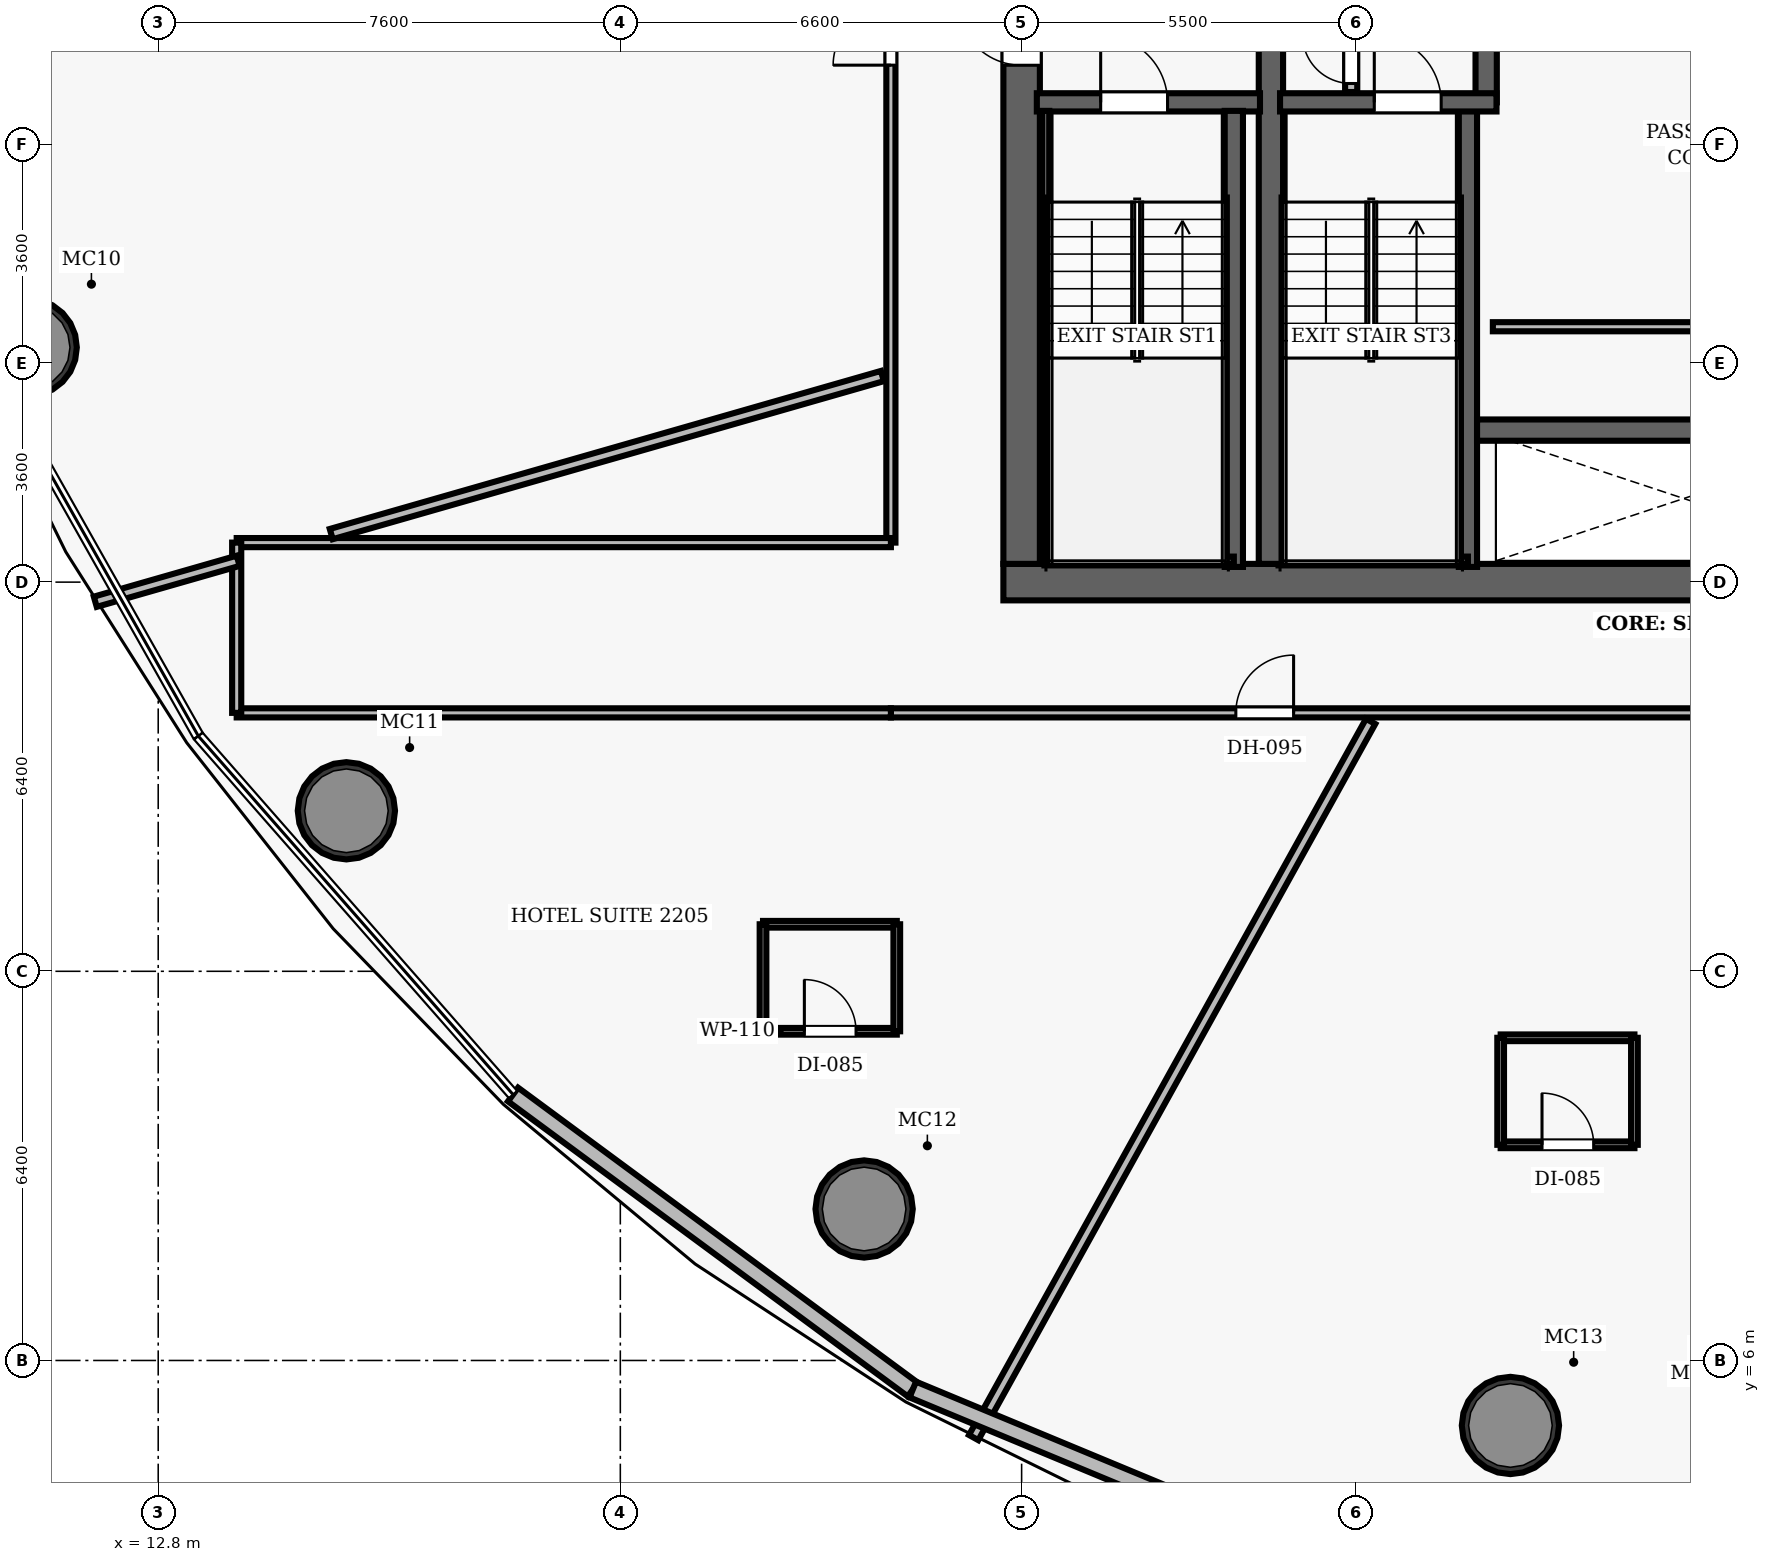
"""IFC4 building model, lengths in metres.
Left out: names, types, materials, properties, quantities, classifications, styles, units other than length and angle.
Written with IfcOpenShell. Run it as: python <this file> out.ifc"""

import sys

from ifc_helpers import new_model, si_unit, direction, frame, frame_2d, origin, origin_2d, place, context, subcontext, project, spatial, rectangle, hollow_circle, extrude, element, fill, save


model = new_model("IFC4")
c1 = context("Model", 3, precision=1e-05, world=origin(), true_north=direction((0.0, 1.0)))
c2 = subcontext(c1, "Body", "Model", "MODEL_VIEW")
j1 = project(units=[si_unit("LENGTHUNIT", "METRE"), si_unit("PLANEANGLEUNIT", "RADIAN")], contexts=[c1])
p1 = place(None, origin())
s1 = spatial("IfcSite", under=j1, at=p1, CompositionType="ELEMENT")
p2 = place(p1, origin())
s2 = spatial("IfcBuilding", under=s1, at=p2, CompositionType="ELEMENT")
p3 = place(p2, frame((0.0, 0.0, 93.9)))
s3 = spatial("IfcBuildingStorey", under=s2, at=p3, CompositionType="ELEMENT", Elevation=93.9)
p4 = place(p3, frame((26.7, 18.8, 0.0), z_axis=(0.0, 0.0, 1.0), x_axis=(1.0, 0.0, 0.0)))
e1 = element("IfcWall", 1, at=p4, inside=s3, PredefinedType="SHEAR", context=c2, shape_type="SweptSolid", body=[
    extrude(rectangle(XDim=22.6, YDim=0.6, at=frame_2d((11.3, 0.0))), origin(), (0.0, 0.0, 1.0), 3.5),
])
p5 = place(p4, frame((14.52, 0.0, 0.0)))
e2 = element("IfcOpeningElement", 2, at=p5, cuts=e1, PredefinedType="OPENING", context=c2, shape_type="SweptSolid", body=[
    extrude(rectangle(XDim=1.05, YDim=2.15, at=frame_2d((0.525, 1.075))), frame((0.0, 0.31, 0.0), z_axis=(0.0, -1.0, 0.0), x_axis=(1.0, 0.0, 0.0)), (0.0, 0.0, 1.0), 0.62),
])
p6 = place(p3, frame((27.0, 19.1, 0.0), z_axis=(0.0, 0.0, 1.0), x_axis=(0.0, 1.0, 0.0)))
e3 = element("IfcWall", 3, at=p6, inside=s3, PredefinedType="SHEAR", context=c2, shape_type="SweptSolid", body=[
    extrude(rectangle(XDim=13.8, YDim=0.6, at=frame_2d((6.9, 0.0))), origin(), (0.0, 0.0, 1.0), 3.5),
])
p7 = place(p6, frame((8.2, 0.0, 0.0)))
e4 = element("IfcOpeningElement", 4, at=p7, cuts=e3, PredefinedType="OPENING", context=c2, shape_type="SweptSolid", body=[
    extrude(rectangle(XDim=1.05, YDim=2.15, at=frame_2d((0.525, 1.075))), frame((0.0, 0.31, 0.0), z_axis=(0.0, -1.0, 0.0), x_axis=(1.0, 0.0, 0.0)), (0.0, 0.0, 1.0), 0.62),
])
p8 = place(p3, frame((31.1, 19.1, 0.0), z_axis=(0.0, 0.0, 1.0), x_axis=(0.0, 1.0, 0.0)))
e5 = element("IfcWall", 5, at=p8, inside=s3, PredefinedType="SHEAR", context=c2, shape_type="SweptSolid", body=[
    extrude(rectangle(XDim=13.8, YDim=0.4, at=frame_2d((6.9, 0.0))), origin(), (0.0, 0.0, 1.0), 3.5),
])
for number, where, z_axis, x_axis in (
    (6, (10.661, 22.66, 0.0), (0.0, 0.0, 1.0), (1.0, 0.0, 0.0)),
    (7, (15.895, 15.04, 0.0), (0.0, 0.0, 1.0), (1.0, 0.0, 0.0)),
    (8, (24.41, 8.491, 0.0), (0.0, 0.0, 1.0), (1.0, 0.0, 0.0)),
    (9, (35.039, 4.931, 0.0), (0.0, 0.0, 1.0), (1.0, 0.0, 0.0)),
):
    element("IfcColumn", number, at=place(p3, frame(where, z_axis=z_axis, x_axis=x_axis)), inside=s3, PredefinedType="COLUMN", context=c2, shape_type="SweptSolid", body=[
        extrude(hollow_circle(Radius=0.8, WallThickness=0.06, at=origin_2d()), origin(), (0.0, 0.0, 1.0), 3.5),
    ])
p9 = place(p3, frame((27.25, 26.69, 0.0), z_axis=(0.0, 0.0, 1.0), x_axis=(1.0, 0.0, 0.0)))
e10 = element("IfcWall", 10, at=p9, inside=s3, PredefinedType="SHEAR", context=c2, shape_type="SweptSolid", body=[
    extrude(rectangle(XDim=3.67, YDim=0.3, at=frame_2d((1.835, 0.0))), origin(), (0.0, 0.0, 1.0), 3.5),
])
p10 = place(p9, frame((1.05, 0.0, 0.0)))
e11 = element("IfcOpeningElement", 11, at=p10, cuts=e10, PredefinedType="OPENING", context=c2, shape_type="SweptSolid", body=[
    extrude(rectangle(XDim=1.1, YDim=2.15, at=frame_2d((0.55, 1.075))), frame((0.0, 0.16, 0.0), z_axis=(0.0, -1.0, 0.0), x_axis=(1.0, 0.0, 0.0)), (0.0, 0.0, 1.0), 0.32),
])
p11 = place(p3, frame((30.49, 19.05, 0.0), z_axis=(0.0, 0.0, 1.0), x_axis=(0.0, 1.0, 0.0)))
e12 = element("IfcWall", 12, at=p11, inside=s3, PredefinedType="SHEAR", context=c2, shape_type="SweptSolid", body=[
    extrude(rectangle(XDim=7.5, YDim=0.3, at=frame_2d((3.75, 0.0))), origin(), (0.0, 0.0, 1.0), 3.5),
])
p12 = place(p3, frame((27.395, 19.1, 0.0), z_axis=(0.0, 0.0, 1.0), x_axis=(0.0, 1.0, 0.0)))
e13 = element("IfcWall", 13, at=p12, inside=s3, PredefinedType="SHEAR", context=c2, shape_type="SweptSolid", body=[
    extrude(rectangle(XDim=7.45, YDim=0.12, at=frame_2d((3.725, 0.0))), origin(), (0.0, 0.0, 1.0), 3.5),
])
p13 = place(p3, frame((27.395, 19.16, 0.0), z_axis=(0.0, 0.0, 1.0), x_axis=(1.0, 0.0, 0.0)))
e14 = element("IfcWall", 14, at=p13, inside=s3, PredefinedType="SHEAR", context=c2, shape_type="SweptSolid", body=[
    extrude(rectangle(XDim=3.095, YDim=0.12, at=frame_2d((1.547, 0.0))), origin(), (0.0, 0.0, 1.0), 3.5),
])
p14 = place(p3, frame((34.34, 19.05, 0.0), z_axis=(0.0, 0.0, 1.0), x_axis=(0.0, 1.0, 0.0)))
e15 = element("IfcWall", 15, at=p14, inside=s3, PredefinedType="SHEAR", context=c2, shape_type="SweptSolid", body=[
    extrude(rectangle(XDim=7.5, YDim=0.3, at=frame_2d((3.75, 0.0))), origin(), (0.0, 0.0, 1.0), 3.5),
])
p15 = place(p3, frame((34.64, 26.69, 0.0), z_axis=(0.0, 0.0, 1.0), x_axis=(0.0, 1.0, 0.0)))
e16 = element("IfcWall", 16, at=p15, inside=s3, PredefinedType="SHEAR", context=c2, shape_type="SweptSolid", body=[
    extrude(rectangle(XDim=6.26, YDim=0.35, at=frame_2d((3.13, 0.0))), origin(), (0.0, 0.0, 1.0), 3.5),
])
p16 = place(p3, frame((31.25, 26.69, 0.0), z_axis=(0.0, 0.0, 1.0), x_axis=(1.0, 0.0, 0.0)))
e17 = element("IfcWall", 17, at=p16, inside=s3, PredefinedType="SHEAR", context=c2, shape_type="SweptSolid", body=[
    extrude(rectangle(XDim=3.56, YDim=0.3, at=frame_2d((1.78, 0.0))), origin(), (0.0, 0.0, 1.0), 3.5),
])
p17 = place(p16, frame((1.55, 0.0, 0.0)))
e18 = element("IfcOpeningElement", 18, at=p17, cuts=e17, PredefinedType="OPENING", context=c2, shape_type="SweptSolid", body=[
    extrude(rectangle(XDim=1.1, YDim=2.15, at=frame_2d((0.55, 1.075))), frame((0.0, 0.16, 0.0), z_axis=(0.0, -1.0, 0.0), x_axis=(1.0, 0.0, 0.0)), (0.0, 0.0, 1.0), 0.32),
])
p18 = place(p3, frame((31.3, 19.16, 0.0), z_axis=(0.0, 0.0, 1.0), x_axis=(1.0, 0.0, 0.0)))
e19 = element("IfcWall", 19, at=p18, inside=s3, PredefinedType="SHEAR", context=c2, shape_type="SweptSolid", body=[
    extrude(rectangle(XDim=3.04, YDim=0.12, at=frame_2d((1.52, 0.0))), origin(), (0.0, 0.0, 1.0), 3.5),
])
p19 = place(p3, frame((32.42, 26.86, 0.0), z_axis=(0.0, 0.0, 1.0), x_axis=(0.0, 1.0, 0.0)))
e20 = element("IfcWall", 20, at=p19, inside=s3, PredefinedType="PARTITIONING", context=c2, shape_type="SweptSolid", body=[
    extrude(rectangle(XDim=2.04, YDim=0.2, at=frame_2d((1.02, 0.0))), origin(), (0.0, 0.0, 1.0), 2.5),
])
p20 = place(p19, frame((0.14, 0.0, 0.0)))
e21 = element("IfcOpeningElement", 21, at=p20, cuts=e20, PredefinedType="OPENING", context=c2, shape_type="SweptSolid", body=[
    extrude(rectangle(XDim=0.8, YDim=2.05, at=frame_2d((0.4, 1.025))), frame((0.0, 0.11, 0.0), z_axis=(0.0, -1.0, 0.0), x_axis=(1.0, 0.0, 0.0)), (0.0, 0.0, 1.0), 0.22),
])
p21 = place(p3, frame((34.49, 21.3, 0.0), z_axis=(0.0, 0.0, 1.0), x_axis=(1.0, 0.0, 0.0)))
e22 = element("IfcWall", 22, at=p21, inside=s3, PredefinedType="SHEAR", context=c2, shape_type="SweptSolid", body=[
    extrude(rectangle(XDim=6.68, YDim=0.35, at=frame_2d((3.34, 0.0))), origin(), (0.0, 0.0, 1.0), 2.5),
])
p22 = place(p3, frame((34.75, 23.0, 0.0), z_axis=(0.0, 0.0, 1.0), x_axis=(1.0, 0.0, 0.0)))
e23 = element("IfcWall", 23, at=p22, inside=s3, PredefinedType="PARTITIONING", context=c2, shape_type="SweptSolid", body=[
    extrude(rectangle(XDim=6.25, YDim=0.15, at=frame_2d((3.125, 0.0))), origin(), (0.0, 0.0, 1.0), 2.5),
])
p23 = place(p3, frame((24.85, 16.65, 0.0), z_axis=(0.0, 0.0, 1.0), x_axis=(1.0, 0.0, 0.0)))
e24 = element("IfcWall", 24, at=p23, inside=s3, PredefinedType="PARTITIONING", context=c2, shape_type="SweptSolid", body=[
    extrude(rectangle(XDim=23.5, YDim=0.15, at=frame_2d((11.75, 0.0))), origin(), (0.0, 0.0, 1.0), 2.5),
])
p24 = place(p23, frame((5.673, 0.0, 0.0)))
e25 = element("IfcOpeningElement", 25, at=p24, cuts=e24, PredefinedType="OPENING", context=c2, shape_type="SweptSolid", body=[
    extrude(rectangle(XDim=0.95, YDim=2.15, at=frame_2d((0.475, 1.075))), frame((0.0, 0.085, 0.0), z_axis=(0.0, -1.0, 0.0), x_axis=(1.0, 0.0, 0.0)), (0.0, 0.0, 1.0), 0.17),
])
p25 = place(p23, frame((13.547, 0.0, 0.0)))
e26 = element("IfcOpeningElement", 26, at=p25, cuts=e24, PredefinedType="OPENING", context=c2, shape_type="SweptSolid", body=[
    extrude(rectangle(XDim=0.95, YDim=2.15, at=frame_2d((0.475, 1.075))), frame((0.0, 0.085, 0.0), z_axis=(0.0, -1.0, 0.0), x_axis=(1.0, 0.0, 0.0)), (0.0, 0.0, 1.0), 0.17),
])
p26 = place(p23, frame((17.077, 0.0, 0.0)))
e27 = element("IfcOpeningElement", 27, at=p26, cuts=e24, PredefinedType="OPENING", context=c2, shape_type="SweptSolid", body=[
    extrude(rectangle(XDim=0.95, YDim=2.15, at=frame_2d((0.475, 1.075))), frame((0.0, 0.085, 0.0), z_axis=(0.0, -1.0, 0.0), x_axis=(1.0, 0.0, 0.0)), (0.0, 0.0, 1.0), 0.17),
])
p27 = place(p3, frame((24.85, 19.45, 0.0), z_axis=(0.0, 0.0, 1.0), x_axis=(0.0, 1.0, 0.0)))
e28 = element("IfcWall", 28, at=p27, inside=s3, PredefinedType="PARTITIONING", context=c2, shape_type="SweptSolid", body=[
    extrude(rectangle(XDim=15.9, YDim=0.15, at=frame_2d((7.95, 0.0))), origin(), (0.0, 0.0, 1.0), 2.5),
])
p28 = place(p27, frame((7.852, 0.0, 0.0)))
e29 = element("IfcOpeningElement", 29, at=p28, cuts=e28, PredefinedType="OPENING", context=c2, shape_type="SweptSolid", body=[
    extrude(rectangle(XDim=0.95, YDim=2.15, at=frame_2d((0.475, 1.075))), frame((0.0, 0.085, 0.0), z_axis=(0.0, -1.0, 0.0), x_axis=(1.0, 0.0, 0.0)), (0.0, 0.0, 1.0), 0.17),
])
for number, where, z_axis, x_axis in (
    (30, (14.091, 19.45, 0.0), (0.0, 0.0, 1.0), (1.0, 0.0, 0.0)),
    (31, (14.091, 16.65, 0.0), (0.0, 0.0, 1.0), (1.0, 0.0, 0.0)),
):
    element("IfcWall", number, at=place(p3, frame(where, z_axis=z_axis, x_axis=x_axis)), inside=s3, PredefinedType="PARTITIONING", context=c2, shape_type="SweptSolid", body=[
        extrude(rectangle(XDim=10.759, YDim=0.15, at=frame_2d((5.38, 0.0))), origin(), (0.0, 0.0, 1.0), 2.5),
    ])
p29 = place(p3, frame((14.091, 16.65, 0.0), z_axis=(0.0, 0.0, 1.0), x_axis=(0.0, 1.0, 0.0)))
e32 = element("IfcWall", 32, at=p29, inside=s3, PredefinedType="PARTITIONING", context=c2, shape_type="SweptSolid", body=[
    extrude(rectangle(XDim=2.8, YDim=0.15, at=frame_2d((1.4, 0.0))), origin(), (0.0, 0.0, 1.0), 2.5),
])
p30 = place(p3, frame((24.71, 22.189, 0.0), z_axis=(0.0, 0.0, 1.0), x_axis=(-0.961261668066, -0.275637453019, 0.0)))
e33 = element("IfcWall", 33, at=p30, inside=s3, PredefinedType="PARTITIONING", context=c2, shape_type="SweptSolid", body=[
    extrude(rectangle(XDim=9.429, YDim=0.175, at=frame_2d((4.715, 0.0))), origin(), (0.0, 0.0, 1.0), 2.5),
])
p31 = place(p3, frame((14.115, 19.151, 0.0), z_axis=(0.0, 0.0, 1.0), x_axis=(-0.961267280853, -0.275617878159, 0.0)))
e34 = element("IfcWall", 34, at=p31, inside=s3, PredefinedType="PARTITIONING", context=c2, shape_type="SweptSolid", body=[
    extrude(rectangle(XDim=2.445, YDim=0.175, at=frame_2d((1.222, 0.0))), origin(), (0.0, 0.0, 1.0), 2.5),
])
p32 = place(p3, frame((32.74, 16.51, 0.0), z_axis=(0.0, 0.0, 1.0), x_axis=(-0.484809935616, -0.874619532327, 0.0)))
e35 = element("IfcWall", 35, at=p32, inside=s3, PredefinedType="PARTITIONING", context=c2, shape_type="SweptSolid", body=[
    extrude(rectangle(XDim=13.466, YDim=0.175, at=frame_2d((6.733, 0.0))), origin(), (0.0, 0.0, 1.0), 2.5),
])
p33 = place(p3, frame((22.747, 11.414, 0.0), z_axis=(0.0, 0.0, 1.0), x_axis=(1.0, 0.0, 0.0)))
e36 = element("IfcWall", 36, at=p33, inside=s3, PredefinedType="PARTITIONING", context=c2, shape_type="SweptSolid", body=[
    extrude(rectangle(XDim=2.2, YDim=0.11, at=frame_2d((1.1, 0.0))), origin(), (0.0, 0.0, 1.0), 2.5),
])
p34 = place(p33, frame((0.68, 0.0, 0.0)))
e37 = element("IfcOpeningElement", 37, at=p34, cuts=e36, PredefinedType="OPENING", context=c2, shape_type="SweptSolid", body=[
    extrude(rectangle(XDim=0.85, YDim=2.1, at=frame_2d((0.425, 1.05))), frame((0.0, 0.065, 0.0), z_axis=(0.0, -1.0, 0.0), x_axis=(1.0, 0.0, 0.0)), (0.0, 0.0, 1.0), 0.13),
])
p35 = place(p3, frame((22.747, 13.174, 0.0), z_axis=(0.0, 0.0, 1.0), x_axis=(1.0, 0.0, 0.0)))
e38 = element("IfcWall", 38, at=p35, inside=s3, PredefinedType="PARTITIONING", context=c2, shape_type="SweptSolid", body=[
    extrude(rectangle(XDim=2.2, YDim=0.11, at=frame_2d((1.1, 0.0))), origin(), (0.0, 0.0, 1.0), 2.5),
])
for number, where, z_axis, x_axis in (
    (39, (22.747, 11.414, 0.0), (0.0, 0.0, 1.0), (0.0, 1.0, 0.0)),
    (40, (24.947, 11.414, 0.0), (0.0, 0.0, 1.0), (0.0, 1.0, 0.0)),
):
    element("IfcWall", number, at=place(p3, frame(where, z_axis=z_axis, x_axis=x_axis)), inside=s3, PredefinedType="PARTITIONING", context=c2, shape_type="SweptSolid", body=[
        extrude(rectangle(XDim=1.76, YDim=0.11, at=frame_2d((0.88, 0.0))), origin(), (0.0, 0.0, 1.0), 2.5),
    ])
p36 = place(p3, frame((34.878, 9.547, 0.0), z_axis=(0.0, 0.0, 1.0), x_axis=(1.0, 0.0, 0.0)))
e41 = element("IfcWall", 41, at=p36, inside=s3, PredefinedType="PARTITIONING", context=c2, shape_type="SweptSolid", body=[
    extrude(rectangle(XDim=2.2, YDim=0.11, at=frame_2d((1.1, 0.0))), origin(), (0.0, 0.0, 1.0), 2.5),
])
p37 = place(p36, frame((0.68, 0.0, 0.0)))
e42 = element("IfcOpeningElement", 42, at=p37, cuts=e41, PredefinedType="OPENING", context=c2, shape_type="SweptSolid", body=[
    extrude(rectangle(XDim=0.85, YDim=2.1, at=frame_2d((0.425, 1.05))), frame((0.0, 0.065, 0.0), z_axis=(0.0, -1.0, 0.0), x_axis=(1.0, 0.0, 0.0)), (0.0, 0.0, 1.0), 0.13),
])
p38 = place(p3, frame((34.878, 11.307, 0.0), z_axis=(0.0, 0.0, 1.0), x_axis=(1.0, 0.0, 0.0)))
e43 = element("IfcWall", 43, at=p38, inside=s3, PredefinedType="PARTITIONING", context=c2, shape_type="SweptSolid", body=[
    extrude(rectangle(XDim=2.2, YDim=0.11, at=frame_2d((1.1, 0.0))), origin(), (0.0, 0.0, 1.0), 2.5),
])
for number, where, z_axis, x_axis in (
    (44, (34.878, 9.547, 0.0), (0.0, 0.0, 1.0), (0.0, 1.0, 0.0)),
    (45, (37.078, 9.547, 0.0), (0.0, 0.0, 1.0), (0.0, 1.0, 0.0)),
):
    element("IfcWall", number, at=place(p3, frame(where, z_axis=z_axis, x_axis=x_axis)), inside=s3, PredefinedType="PARTITIONING", context=c2, shape_type="SweptSolid", body=[
        extrude(rectangle(XDim=1.76, YDim=0.11, at=frame_2d((0.88, 0.0))), origin(), (0.0, 0.0, 1.0), 2.5),
    ])
p39 = place(p3, frame((25.21, 5.522, 0.0), z_axis=(0.0, 0.0, 1.0), x_axis=(-0.804633561054, 0.593771700593, 0.0)))
e46 = element("IfcWall", 46, at=p39, inside=s3, PredefinedType="SOLIDWALL", context=c2, shape_type="SweptSolid", body=[
    extrude(rectangle(XDim=8.171, YDim=0.28, at=frame_2d((4.085, 0.0))), origin(), (0.0, 0.0, 1.0), 3.15),
])
p40 = place(p3, frame((32.821, 2.361, 0.0), z_axis=(0.0, 0.0, 1.0), x_axis=(-0.923498815139, 0.383601275333, 0.0)))
e47 = element("IfcWall", 47, at=p40, inside=s3, PredefinedType="SOLIDWALL", context=c2, shape_type="SweptSolid", body=[
    extrude(rectangle(XDim=8.241, YDim=0.28, at=frame_2d((4.121, 0.0))), origin(), (0.0, 0.0, 1.0), 3.15),
])
p41 = place(p10, origin())
e48 = element("IfcDoor", 48, at=p41, inside=s3, OperationType="SINGLE_SWING_LEFT", PredefinedType="DOOR", context=c2, shape_type="SweptSolid", body=[
    extrude(rectangle(XDim=1.1, YDim=2.15, at=frame_2d((0.55, 1.075))), frame((0.0, 0.025, 0.0), z_axis=(0.0, -1.0, 0.0), x_axis=(1.0, 0.0, 0.0)), (0.0, 0.0, 1.0), 0.05),
])
fill(e11, e48)
p42 = place(p7, origin())
e49 = element("IfcDoor", 49, at=p42, inside=s3, OperationType="SINGLE_SWING_RIGHT", PredefinedType="DOOR", context=c2, shape_type="SweptSolid", body=[
    extrude(rectangle(XDim=1.05, YDim=2.15, at=frame_2d((0.525, 1.075))), frame((0.0, 0.025, 0.0), z_axis=(0.0, -1.0, 0.0), x_axis=(1.0, 0.0, 0.0)), (0.0, 0.0, 1.0), 0.05),
])
fill(e4, e49)
p43 = place(p17, origin())
e50 = element("IfcDoor", 50, at=p43, inside=s3, OperationType="SINGLE_SWING_LEFT", PredefinedType="DOOR", context=c2, shape_type="SweptSolid", body=[
    extrude(rectangle(XDim=1.1, YDim=2.15, at=frame_2d((0.55, 1.075))), frame((0.0, 0.025, 0.0), z_axis=(0.0, -1.0, 0.0), x_axis=(1.0, 0.0, 0.0)), (0.0, 0.0, 1.0), 0.05),
])
fill(e18, e50)
p44 = place(p20, origin())
e51 = element("IfcDoor", 51, at=p44, inside=s3, OperationType="SINGLE_SWING_RIGHT", PredefinedType="DOOR", context=c2, shape_type="SweptSolid", body=[
    extrude(rectangle(XDim=0.8, YDim=2.05, at=frame_2d((0.4, 1.025))), frame((0.0, 0.025, 0.0), z_axis=(0.0, -1.0, 0.0), x_axis=(1.0, 0.0, 0.0)), (0.0, 0.0, 1.0), 0.05),
])
fill(e21, e51)
p45 = place(p28, origin())
e52 = element("IfcDoor", 52, at=p45, inside=s3, OperationType="SINGLE_SWING_LEFT", PredefinedType="DOOR", context=c2, shape_type="SweptSolid", body=[
    extrude(rectangle(XDim=0.95, YDim=2.15, at=frame_2d((0.475, 1.075))), frame((0.0, 0.025, 0.0), z_axis=(0.0, -1.0, 0.0), x_axis=(1.0, 0.0, 0.0)), (0.0, 0.0, 1.0), 0.05),
])
fill(e29, e52)
p46 = place(p24, origin())
e53 = element("IfcDoor", 53, at=p46, inside=s3, OperationType="SINGLE_SWING_RIGHT", PredefinedType="DOOR", context=c2, shape_type="SweptSolid", body=[
    extrude(rectangle(XDim=0.95, YDim=2.15, at=frame_2d((0.475, 1.075))), frame((0.0, 0.025, 0.0), z_axis=(0.0, -1.0, 0.0), x_axis=(1.0, 0.0, 0.0)), (0.0, 0.0, 1.0), 0.05),
])
fill(e25, e53)
p47 = place(p34, origin())
e54 = element("IfcDoor", 54, at=p47, inside=s3, OperationType="SINGLE_SWING_LEFT", PredefinedType="DOOR", context=c2, shape_type="SweptSolid", body=[
    extrude(rectangle(XDim=0.85, YDim=2.1, at=frame_2d((0.425, 1.05))), frame((0.0, 0.025, 0.0), z_axis=(0.0, -1.0, 0.0), x_axis=(1.0, 0.0, 0.0)), (0.0, 0.0, 1.0), 0.05),
])
fill(e37, e54)
p48 = place(p37, origin())
e55 = element("IfcDoor", 55, at=p48, inside=s3, OperationType="SINGLE_SWING_LEFT", PredefinedType="DOOR", context=c2, shape_type="SweptSolid", body=[
    extrude(rectangle(XDim=0.85, YDim=2.1, at=frame_2d((0.425, 1.05))), frame((0.0, 0.025, 0.0), z_axis=(0.0, -1.0, 0.0), x_axis=(1.0, 0.0, 0.0)), (0.0, 0.0, 1.0), 0.05),
])
fill(e42, e55)
save(model, sys.argv[1])
